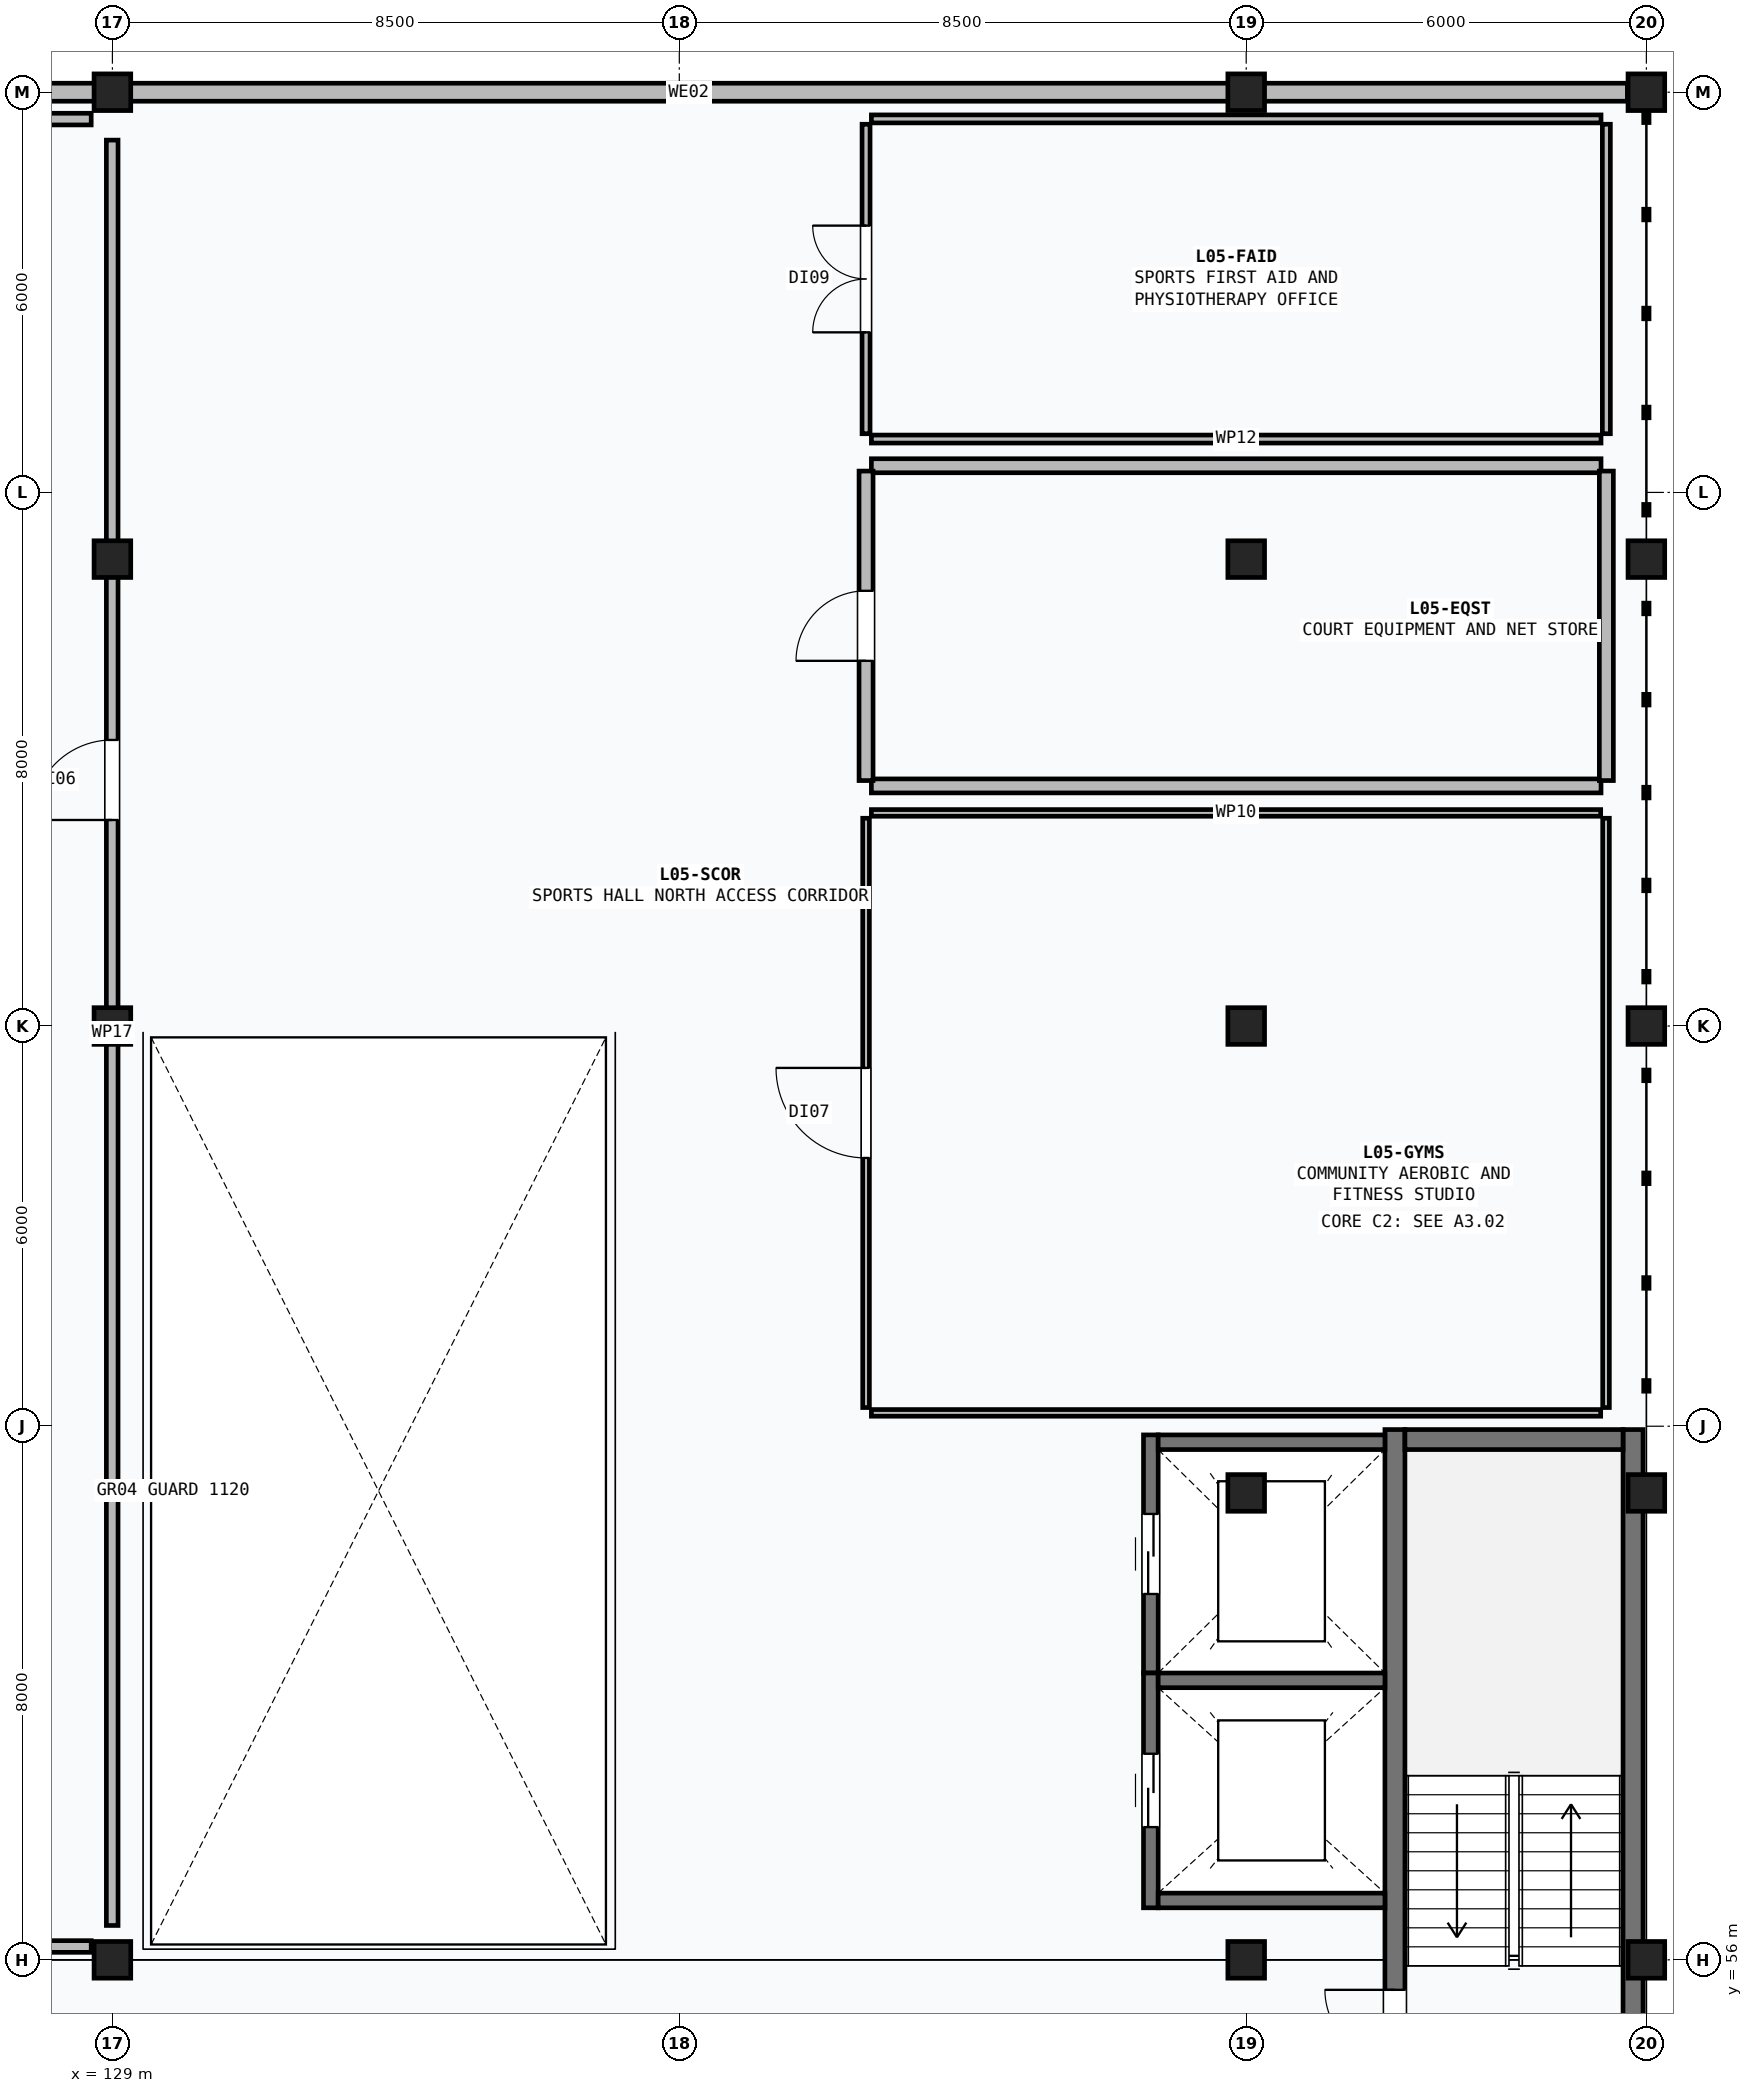
"""IFC4 building model, lengths in metres.
Left out: names, types, materials, properties, quantities, classifications, styles, units other than length and angle.
Written with IfcOpenShell. Run it as: python <this file> out.ifc"""

import sys

from ifc_helpers import new_model, si_unit, direction, frame, frame_2d, origin, origin_2d, place, context, subcontext, project, spatial, rectangle, extrude, element, fill, save


model = new_model("IFC4")
c1 = context("Model", 3, precision=1e-05, world=origin(), true_north=direction((0.0, 1.0)))
c2 = subcontext(c1, "Body", "Model", "MODEL_VIEW")
j1 = project(units=[si_unit("LENGTHUNIT", "METRE"), si_unit("PLANEANGLEUNIT", "RADIAN")], contexts=[c1])
p1 = place(None, origin())
s1 = spatial("IfcSite", under=j1, at=p1, CompositionType="ELEMENT")
p2 = place(p1, origin())
s2 = spatial("IfcBuilding", under=s1, at=p2, CompositionType="ELEMENT")
p3 = place(p2, frame((0.0, 0.0, 19.2)))
s3 = spatial("IfcBuildingStorey", under=s2, at=p3, CompositionType="ELEMENT", Elevation=19.2)
for number, where, z_axis, x_axis in (
    (1, (129.0, 56.0, 0.0), (0.0, 0.0, 1.0), (1.0, 0.0, 0.0)),
    (2, (129.0, 70.0, 0.0), (0.0, 0.0, 1.0), (1.0, 0.0, 0.0)),
    (3, (129.0, 77.0, 0.0), (0.0, 0.0, 1.0), (1.0, 0.0, 0.0)),
    (4, (129.0, 84.0, 0.0), (0.0, 0.0, 1.0), (1.0, 0.0, 0.0)),
    (5, (146.0, 56.0, 0.0), (0.0, 0.0, 1.0), (1.0, 0.0, 0.0)),
    (6, (146.0, 63.0, 0.0), (0.0, 0.0, 1.0), (1.0, 0.0, 0.0)),
    (7, (146.0, 70.0, 0.0), (0.0, 0.0, 1.0), (1.0, 0.0, 0.0)),
    (8, (146.0, 77.0, 0.0), (0.0, 0.0, 1.0), (1.0, 0.0, 0.0)),
    (9, (146.0, 84.0, 0.0), (0.0, 0.0, 1.0), (1.0, 0.0, 0.0)),
    (10, (152.0, 56.0, 0.0), (0.0, 0.0, 1.0), (1.0, 0.0, 0.0)),
    (11, (152.0, 63.0, 0.0), (0.0, 0.0, 1.0), (1.0, 0.0, 0.0)),
    (12, (152.0, 70.0, 0.0), (0.0, 0.0, 1.0), (1.0, 0.0, 0.0)),
    (13, (152.0, 77.0, 0.0), (0.0, 0.0, 1.0), (1.0, 0.0, 0.0)),
    (14, (152.0, 84.0, 0.0), (0.0, 0.0, 1.0), (1.0, 0.0, 0.0)),
):
    element("IfcColumn", number, at=place(p3, frame(where, z_axis=z_axis, x_axis=x_axis)), inside=s3, PredefinedType="COLUMN", context=c2, shape_type="SweptSolid", body=[
        extrude(rectangle(XDim=0.55, YDim=0.55, at=origin_2d()), origin(), (0.0, 0.0, 1.0), 3.6),
    ])
p4 = place(p3, frame((151.715, 84.0, 0.0), z_axis=(0.0, 0.0, 1.0), x_axis=(-1.0, 0.0, 0.0)))
e15 = element("IfcWall", 15, at=p4, inside=s3, PredefinedType="SOLIDWALL", context=c2, shape_type="SweptSolid", body=[
    extrude(rectangle(XDim=39.43, YDim=0.27, at=frame_2d((19.715, 0.0))), origin(), (0.0, 0.0, 1.0), 2.495),
])
p5 = place(p3, frame((148.23, 54.05, 0.0), z_axis=(0.0, 0.0, 1.0), x_axis=(0.0, 1.0, 0.0)))
e16 = element("IfcWall", 16, at=p5, inside=s3, PredefinedType="SHEAR", context=c2, shape_type="SweptSolid", body=[
    extrude(rectangle(XDim=9.9, YDim=0.3, at=frame_2d((4.95, 0.0))), origin(), (0.0, 0.0, 1.0), 3.6),
])
p6 = place(p5, frame((0.45, 0.0, 0.0)))
e17 = element("IfcOpeningElement", 17, at=p6, cuts=e16, PredefinedType="OPENING", context=c2, shape_type="SweptSolid", body=[
    extrude(rectangle(XDim=1.05, YDim=2.15, at=frame_2d((0.525, 1.075))), frame((0.0, 0.16, 0.0), z_axis=(0.0, -1.0, 0.0), x_axis=(1.0, 0.0, 0.0)), (0.0, 0.0, 1.0), 0.32),
])
p7 = place(p3, frame((151.8, 63.95, 0.0), z_axis=(0.0, 0.0, 1.0), x_axis=(0.0, -1.0, 0.0)))
e18 = element("IfcWall", 18, at=p7, inside=s3, PredefinedType="SHEAR", context=c2, shape_type="SweptSolid", body=[
    extrude(rectangle(XDim=9.9, YDim=0.3, at=frame_2d((4.95, 0.0))), origin(), (0.0, 0.0, 1.0), 3.6),
])
p8 = place(p3, frame((148.38, 63.8, 0.0), z_axis=(0.0, 0.0, 1.0), x_axis=(1.0, 0.0, 0.0)))
e19 = element("IfcWall", 19, at=p8, inside=s3, PredefinedType="SHEAR", context=c2, shape_type="SweptSolid", body=[
    extrude(rectangle(XDim=3.27, YDim=0.3, at=frame_2d((1.635, 0.0))), origin(), (0.0, 0.0, 1.0), 3.6),
])
p9 = place(p3, frame((144.57, 60.3, 0.0), z_axis=(0.0, 0.0, 1.0), x_axis=(0.0, 1.0, 0.0)))
e20 = element("IfcWall", 20, at=p9, inside=s3, PredefinedType="SHEAR", context=c2, shape_type="SweptSolid", body=[
    extrude(rectangle(XDim=3.57, YDim=0.22, at=frame_2d((1.785, 0.0))), origin(), (0.0, 0.0, 1.0), 3.6),
])
p10 = place(p9, frame((1.185, 0.0, 0.0)))
e21 = element("IfcOpeningElement", 21, at=p10, cuts=e20, PredefinedType="OPENING", context=c2, shape_type="SweptSolid", body=[
    extrude(rectangle(XDim=1.2, YDim=2.2, at=frame_2d((0.6, 1.1))), frame((0.0, 0.12, 0.0), z_axis=(0.0, -1.0, 0.0), x_axis=(1.0, 0.0, 0.0)), (0.0, 0.0, 1.0), 0.24),
])
p11 = place(p3, frame((144.68, 63.76, 0.0), z_axis=(0.0, 0.0, 1.0), x_axis=(1.0, 0.0, 0.0)))
e22 = element("IfcWall", 22, at=p11, inside=s3, PredefinedType="SHEAR", context=c2, shape_type="SweptSolid", body=[
    extrude(rectangle(XDim=3.4, YDim=0.22, at=frame_2d((1.7, 0.0))), origin(), (0.0, 0.0, 1.0), 3.6),
])
p12 = place(p3, frame((144.57, 56.78, 0.0), z_axis=(0.0, 0.0, 1.0), x_axis=(0.0, 1.0, 0.0)))
e23 = element("IfcWall", 23, at=p12, inside=s3, PredefinedType="SHEAR", context=c2, shape_type="SweptSolid", body=[
    extrude(rectangle(XDim=3.52, YDim=0.22, at=frame_2d((1.76, 0.0))), origin(), (0.0, 0.0, 1.0), 3.6),
])
p13 = place(p12, frame((1.21, 0.0, 0.0)))
e24 = element("IfcOpeningElement", 24, at=p13, cuts=e23, PredefinedType="OPENING", context=c2, shape_type="SweptSolid", body=[
    extrude(rectangle(XDim=1.1, YDim=2.2, at=frame_2d((0.55, 1.1))), frame((0.0, 0.12, 0.0), z_axis=(0.0, -1.0, 0.0), x_axis=(1.0, 0.0, 0.0)), (0.0, 0.0, 1.0), 0.24),
])
for number, where, z_axis, x_axis in (
    (25, (148.08, 56.89, 0.0), (0.0, 0.0, 1.0), (-1.0, 0.0, 0.0)),
    (26, (144.68, 60.19, 0.0), (0.0, 0.0, 1.0), (1.0, 0.0, 0.0)),
):
    element("IfcWall", number, at=place(p3, frame(where, z_axis=z_axis, x_axis=x_axis)), inside=s3, PredefinedType="SHEAR", context=c2, shape_type="SweptSolid", body=[
        extrude(rectangle(XDim=3.4, YDim=0.22, at=frame_2d((1.7, 0.0))), origin(), (0.0, 0.0, 1.0), 3.6),
    ])
for number, where, z_axis, x_axis in (
    (27, (112.48, 56.2, 0.0), (0.0, 0.0, 1.0), (1.0, 0.0, 0.0)),
    (28, (112.48, 83.597, 0.0), (0.0, 0.0, 1.0), (1.0, 0.0, 0.0)),
):
    element("IfcWall", number, at=place(p3, frame(where, z_axis=z_axis, x_axis=x_axis)), inside=s3, PredefinedType="PARTITIONING", context=c2, shape_type="SweptSolid", body=[
        extrude(rectangle(XDim=16.202, YDim=0.175, at=frame_2d((8.101, 0.0))), origin(), (0.0, 0.0, 1.0), 2.495),
    ])
p14 = place(p3, frame((128.997, 56.515, 0.0), z_axis=(0.0, 0.0, 1.0), x_axis=(0.0, 1.0, 0.0)))
e29 = element("IfcWall", 29, at=p14, inside=s3, PredefinedType="PARTITIONING", context=c2, shape_type="SweptSolid", body=[
    extrude(rectangle(XDim=26.767, YDim=0.175, at=frame_2d((13.384, 0.0))), origin(), (0.0, 0.0, 1.0), 2.495),
])
p15 = place(p14, frame((16.574, 0.0, 0.0)))
e30 = element("IfcOpeningElement", 30, at=p15, cuts=e29, PredefinedType="OPENING", context=c2, shape_type="SweptSolid", body=[
    extrude(rectangle(XDim=1.2, YDim=2.15, at=frame_2d((0.6, 1.075))), frame((0.0, 0.098, 0.0), z_axis=(0.0, -1.0, 0.0), x_axis=(1.0, 0.0, 0.0)), (0.0, 0.0, 1.0), 0.195),
])
p16 = place(p3, frame((140.38, 64.2, 0.0), z_axis=(0.0, 0.0, 1.0), x_axis=(1.0, 0.0, 0.0)))
e31 = element("IfcWall", 31, at=p16, inside=s3, PredefinedType="PARTITIONING", context=c2, shape_type="SweptSolid", body=[
    extrude(rectangle(XDim=10.935, YDim=0.1, at=frame_2d((5.468, 0.0))), origin(), (0.0, 0.0, 1.0), 3.345),
])
p17 = place(p3, frame((140.38, 73.195, 0.0), z_axis=(0.0, 0.0, 1.0), x_axis=(1.0, 0.0, 0.0)))
e32 = element("IfcWall", 32, at=p17, inside=s3, PredefinedType="PARTITIONING", context=c2, shape_type="SweptSolid", body=[
    extrude(rectangle(XDim=10.935, YDim=0.1, at=frame_2d((5.468, 0.0))), origin(), (0.0, 0.0, 1.0), 2.495),
])
p18 = place(p3, frame((140.3, 64.28, 0.0), z_axis=(0.0, 0.0, 1.0), x_axis=(0.0, 1.0, 0.0)))
e33 = element("IfcWall", 33, at=p18, inside=s3, PredefinedType="PARTITIONING", context=c2, shape_type="SweptSolid", body=[
    extrude(rectangle(XDim=8.835, YDim=0.1, at=frame_2d((4.417, 0.0))), origin(), (0.0, 0.0, 1.0), 2.495),
])
p19 = place(p18, frame((3.742, 0.0, 0.0)))
e34 = element("IfcOpeningElement", 34, at=p19, cuts=e33, PredefinedType="OPENING", context=c2, shape_type="SweptSolid", body=[
    extrude(rectangle(XDim=1.35, YDim=2.15, at=frame_2d((0.675, 1.075))), frame((0.0, 0.06, 0.0), z_axis=(0.0, -1.0, 0.0), x_axis=(1.0, 0.0, 0.0)), (0.0, 0.0, 1.0), 0.12),
])
p20 = place(p3, frame((151.395, 64.28, 0.0), z_axis=(0.0, 0.0, 1.0), x_axis=(0.0, 1.0, 0.0)))
e35 = element("IfcWall", 35, at=p20, inside=s3, PredefinedType="PARTITIONING", context=c2, shape_type="SweptSolid", body=[
    extrude(rectangle(XDim=8.835, YDim=0.1, at=frame_2d((4.417, 0.0))), origin(), (0.0, 0.0, 1.0), 2.745),
])
for number, where, z_axis, x_axis in (
    (36, (140.38, 73.6, 0.0), (0.0, 0.0, 1.0), (1.0, 0.0, 0.0)),
    (37, (140.38, 78.4, 0.0), (0.0, 0.0, 1.0), (1.0, 0.0, 0.0)),
):
    element("IfcWall", number, at=place(p3, frame(where, z_axis=z_axis, x_axis=x_axis)), inside=s3, PredefinedType="PARTITIONING", context=c2, shape_type="SweptSolid", body=[
        extrude(rectangle(XDim=10.94, YDim=0.21, at=frame_2d((5.47, 0.0))), origin(), (0.0, 0.0, 1.0), 2.495),
    ])
p21 = place(p3, frame((140.3, 73.68, 0.0), z_axis=(0.0, 0.0, 1.0), x_axis=(0.0, 1.0, 0.0)))
e38 = element("IfcWall", 38, at=p21, inside=s3, PredefinedType="PARTITIONING", context=c2, shape_type="SweptSolid", body=[
    extrude(rectangle(XDim=4.64, YDim=0.21, at=frame_2d((2.32, 0.0))), origin(), (0.0, 0.0, 1.0), 2.495),
])
p22 = place(p21, frame((1.795, 0.0, 0.0)))
e39 = element("IfcOpeningElement", 39, at=p22, cuts=e38, PredefinedType="OPENING", context=c2, shape_type="SweptSolid", body=[
    extrude(rectangle(XDim=1.05, YDim=2.15, at=frame_2d((0.525, 1.075))), frame((0.0, 0.115, 0.0), z_axis=(0.0, -1.0, 0.0), x_axis=(1.0, 0.0, 0.0)), (0.0, 0.0, 1.0), 0.23),
])
p23 = place(p3, frame((151.4, 73.68, 0.0), z_axis=(0.0, 0.0, 1.0), x_axis=(0.0, 1.0, 0.0)))
e40 = element("IfcWall", 40, at=p23, inside=s3, PredefinedType="PARTITIONING", context=c2, shape_type="SweptSolid", body=[
    extrude(rectangle(XDim=4.64, YDim=0.21, at=frame_2d((2.32, 0.0))), origin(), (0.0, 0.0, 1.0), 2.745),
])
for number, where, z_axis, x_axis in (
    (41, (140.38, 78.8, 0.0), (0.0, 0.0, 1.0), (1.0, 0.0, 0.0)),
    (42, (140.38, 83.6, 0.0), (0.0, 0.0, 1.0), (1.0, 0.0, 0.0)),
):
    element("IfcWall", number, at=place(p3, frame(where, z_axis=z_axis, x_axis=x_axis)), inside=s3, PredefinedType="PARTITIONING", context=c2, shape_type="SweptSolid", body=[
        extrude(rectangle(XDim=10.94, YDim=0.12, at=frame_2d((5.47, 0.0))), origin(), (0.0, 0.0, 1.0), 2.495),
    ])
p24 = place(p3, frame((140.3, 78.88, 0.0), z_axis=(0.0, 0.0, 1.0), x_axis=(0.0, 1.0, 0.0)))
e43 = element("IfcWall", 43, at=p24, inside=s3, PredefinedType="PARTITIONING", context=c2, shape_type="SweptSolid", body=[
    extrude(rectangle(XDim=4.64, YDim=0.12, at=frame_2d((2.32, 0.0))), origin(), (0.0, 0.0, 1.0), 2.455),
])
p25 = place(p24, frame((1.52, 0.0, 0.0)))
e44 = element("IfcOpeningElement", 44, at=p25, cuts=e43, PredefinedType="OPENING", context=c2, shape_type="SweptSolid", body=[
    extrude(rectangle(XDim=1.6, YDim=2.15, at=frame_2d((0.8, 1.075))), frame((0.0, 0.07, 0.0), z_axis=(0.0, -1.0, 0.0), x_axis=(1.0, 0.0, 0.0)), (0.0, 0.0, 1.0), 0.14),
])
p26 = place(p3, frame((151.4, 78.88, 0.0), z_axis=(0.0, 0.0, 1.0), x_axis=(0.0, 1.0, 0.0)))
e45 = element("IfcWall", 45, at=p26, inside=s3, PredefinedType="PARTITIONING", context=c2, shape_type="SweptSolid", body=[
    extrude(rectangle(XDim=4.64, YDim=0.12, at=frame_2d((2.32, 0.0))), origin(), (0.0, 0.0, 1.0), 2.755),
])
p27 = place(p6, origin())
e46 = element("IfcDoor", 46, at=p27, inside=s3, OperationType="SINGLE_SWING_RIGHT", PredefinedType="DOOR", context=c2, shape_type="SweptSolid", body=[
    extrude(rectangle(XDim=1.05, YDim=2.15, at=frame_2d((0.525, 1.075))), frame((0.0, 0.025, 0.0), z_axis=(0.0, -1.0, 0.0), x_axis=(1.0, 0.0, 0.0)), (0.0, 0.0, 1.0), 0.05),
])
fill(e17, e46)
p28 = place(p10, origin())
e47 = element("IfcDoor", 47, at=p28, inside=s3, OperationType="DOUBLE_DOOR_SLIDING", PredefinedType="DOOR", context=c2, shape_type="SweptSolid", body=[
    extrude(rectangle(XDim=1.2, YDim=2.2, at=frame_2d((0.6, 1.1))), frame((0.0, 0.025, 0.0), z_axis=(0.0, -1.0, 0.0), x_axis=(1.0, 0.0, 0.0)), (0.0, 0.0, 1.0), 0.05),
])
fill(e21, e47)
p29 = place(p13, origin())
e48 = element("IfcDoor", 48, at=p29, inside=s3, OperationType="DOUBLE_DOOR_SLIDING", PredefinedType="DOOR", context=c2, shape_type="SweptSolid", body=[
    extrude(rectangle(XDim=1.1, YDim=2.2, at=frame_2d((0.55, 1.1))), frame((0.0, 0.025, 0.0), z_axis=(0.0, -1.0, 0.0), x_axis=(1.0, 0.0, 0.0)), (0.0, 0.0, 1.0), 0.05),
])
fill(e24, e48)
p30 = place(p15, origin())
e49 = element("IfcDoor", 49, at=p30, inside=s3, OperationType="SINGLE_SWING_LEFT", PredefinedType="DOOR", context=c2, shape_type="SweptSolid", body=[
    extrude(rectangle(XDim=1.2, YDim=2.15, at=frame_2d((0.6, 1.075))), frame((0.0, 0.025, 0.0), z_axis=(0.0, -1.0, 0.0), x_axis=(1.0, 0.0, 0.0)), (0.0, 0.0, 1.0), 0.05),
])
fill(e30, e49)
p31 = place(p19, origin())
e50 = element("IfcDoor", 50, at=p31, inside=s3, OperationType="SINGLE_SWING_RIGHT", PredefinedType="DOOR", context=c2, shape_type="SweptSolid", body=[
    extrude(rectangle(XDim=1.35, YDim=2.15, at=frame_2d((0.675, 1.075))), frame((0.0, 0.025, 0.0), z_axis=(0.0, -1.0, 0.0), x_axis=(1.0, 0.0, 0.0)), (0.0, 0.0, 1.0), 0.05),
])
fill(e34, e50)
p32 = place(p22, origin())
e51 = element("IfcDoor", 51, at=p32, inside=s3, OperationType="SINGLE_SWING_LEFT", PredefinedType="DOOR", context=c2, shape_type="SweptSolid", body=[
    extrude(rectangle(XDim=1.05, YDim=2.15, at=frame_2d((0.525, 1.075))), frame((0.0, 0.025, 0.0), z_axis=(0.0, -1.0, 0.0), x_axis=(1.0, 0.0, 0.0)), (0.0, 0.0, 1.0), 0.05),
])
fill(e39, e51)
p33 = place(p25, origin())
e52 = element("IfcDoor", 52, at=p33, inside=s3, OperationType="DOUBLE_DOOR_SINGLE_SWING", PredefinedType="DOOR", context=c2, shape_type="SweptSolid", body=[
    extrude(rectangle(XDim=1.6, YDim=2.15, at=frame_2d((0.8, 1.075))), frame((0.0, 0.025, 0.0), z_axis=(0.0, -1.0, 0.0), x_axis=(1.0, 0.0, 0.0)), (0.0, 0.0, 1.0), 0.05),
])
fill(e44, e52)
save(model, sys.argv[1])
